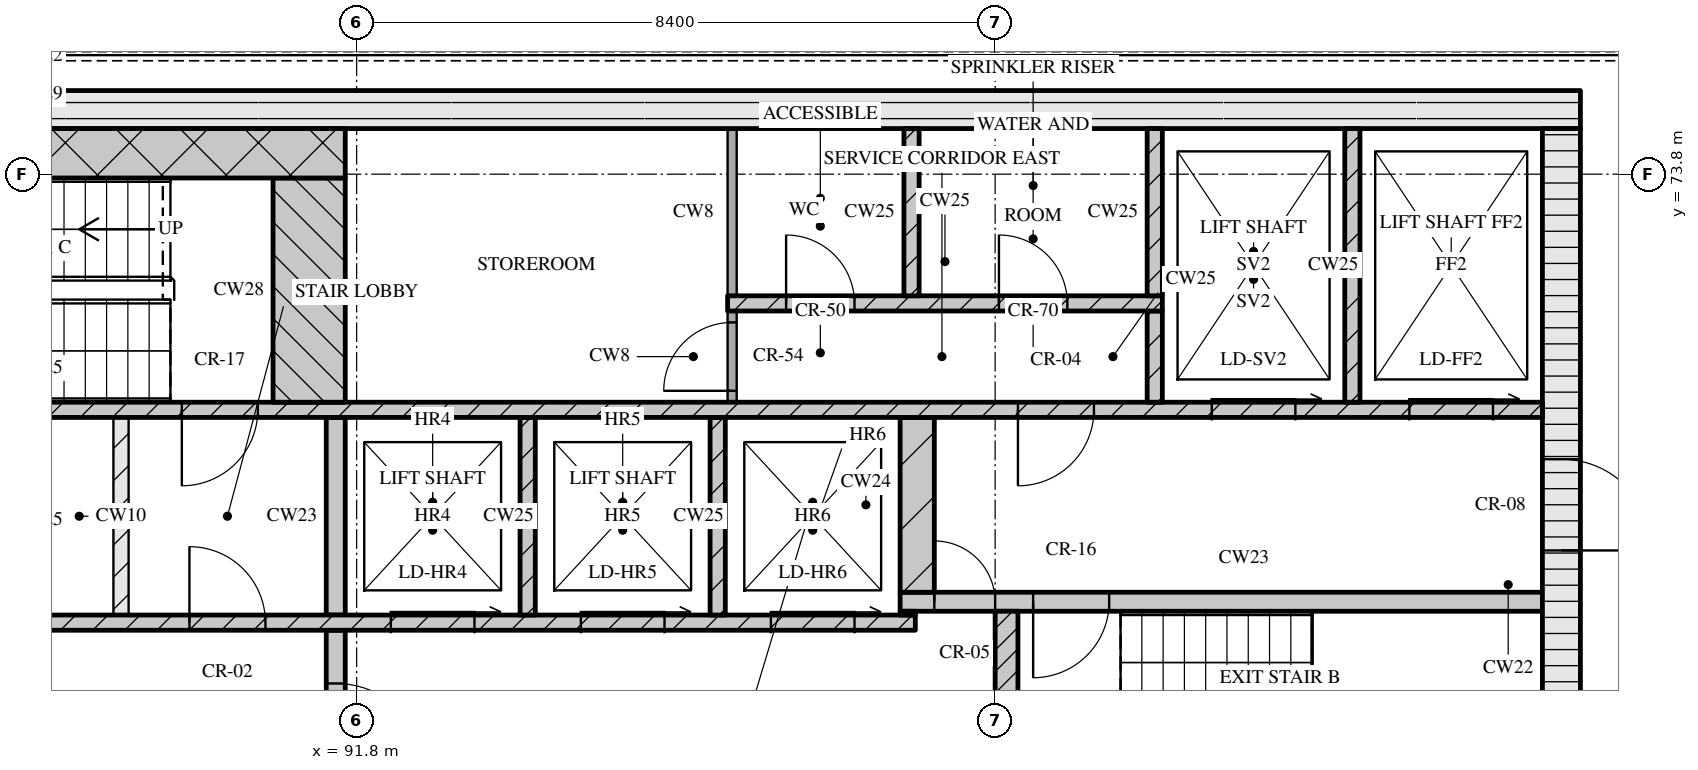
"""IFC4 building model, lengths in metres.
Left out: names, types, materials, properties, quantities, classifications, styles, units other than length and angle.
Written with IfcOpenShell. Run it as: python <this file> out.ifc"""

import sys

from ifc_helpers import new_model, si_unit, direction, frame, frame_2d, origin, place, context, subcontext, project, spatial, rectangle, extrude, element, fill, save


model = new_model("IFC4")
c1 = context("Model", 3, precision=1e-05, world=origin(), true_north=direction((0.0, 1.0)))
c2 = subcontext(c1, "Body", "Model", "MODEL_VIEW")
j1 = project(units=[si_unit("LENGTHUNIT", "METRE"), si_unit("PLANEANGLEUNIT", "RADIAN")], contexts=[c1])
p1 = place(None, origin())
s1 = spatial("IfcSite", under=j1, at=p1, CompositionType="ELEMENT")
p2 = place(p1, origin())
s2 = spatial("IfcBuilding", under=s1, at=p2, CompositionType="ELEMENT")
p3 = place(p2, frame((0.0, 0.0, 288.75)))
s3 = spatial("IfcBuildingStorey", under=s2, at=p3, CompositionType="ELEMENT", Elevation=288.75)
p4 = place(p3, frame((67.3, 74.65, 0.0), z_axis=(0.0, 0.0, 1.0), x_axis=(1.0, 0.0, 0.0)))
e1 = element("IfcWall", 1, at=p4, inside=s3, PredefinedType="SOLIDWALL", context=c2, shape_type="SweptSolid", body=[
    extrude(rectangle(XDim=40.6, YDim=0.5, at=frame_2d((20.3, 0.0))), origin(), (0.0, 0.0, 1.0), 3.32),
])
p5 = place(p3, frame((107.65, 62.4, 0.0), z_axis=(0.0, 0.0, 1.0), x_axis=(0.0, 1.0, 0.0)))
e2 = element("IfcWall", 2, at=p5, inside=s3, PredefinedType="SOLIDWALL", context=c2, shape_type="SweptSolid", body=[
    extrude(rectangle(XDim=12.0, YDim=0.5, at=frame_2d((6.0, 0.0))), origin(), (0.0, 0.0, 1.0), 3.32),
])
p6 = place(p5, frame((6.45, 0.0, 0.0)))
e3 = element("IfcOpeningElement", 3, at=p6, cuts=e2, PredefinedType="OPENING", context=c2, shape_type="SweptSolid", body=[
    extrude(rectangle(XDim=1.2, YDim=2.1, at=frame_2d((0.6, 1.05))), frame((0.0, 0.26, 0.0), z_axis=(0.0, -1.0, 0.0), x_axis=(1.0, 0.0, 0.0)), (0.0, 0.0, 1.0), 0.52),
])
p7 = place(p3, frame((91.525, 65.2, 0.0), z_axis=(0.0, 0.0, 1.0), x_axis=(0.0, 1.0, 0.0)))
e4 = element("IfcWall", 4, at=p7, inside=s3, PredefinedType="SOLIDWALL", context=c2, shape_type="SweptSolid", body=[
    extrude(rectangle(XDim=2.6, YDim=0.25, at=frame_2d((1.3, 0.0))), origin(), (0.0, 0.0, 1.0), 3.32),
])
p8 = place(p7, frame((0.7, 0.0, 0.0)))
e5 = element("IfcOpeningElement", 5, at=p8, cuts=e4, PredefinedType="OPENING", context=c2, shape_type="SweptSolid", body=[
    extrude(rectangle(XDim=1.2, YDim=2.1, at=frame_2d((0.6, 1.05))), frame((0.0, 0.135, 0.0), z_axis=(0.0, -1.0, 0.0), x_axis=(1.0, 0.0, 0.0)), (0.0, 0.0, 1.0), 0.27),
])
p9 = place(p3, frame((100.35, 65.2, 0.0), z_axis=(0.0, 0.0, 1.0), x_axis=(0.0, 1.0, 0.0)))
e6 = element("IfcWall", 6, at=p9, inside=s3, PredefinedType="SOLIDWALL", context=c2, shape_type="SweptSolid", body=[
    extrude(rectangle(XDim=2.85, YDim=0.3, at=frame_2d((1.425, 0.0))), origin(), (0.0, 0.0, 1.0), 3.32),
])
p10 = place(p3, frame((76.05, 67.9, 0.0), z_axis=(0.0, 0.0, 1.0), x_axis=(1.0, 0.0, 0.0)))
e7 = element("IfcWall", 7, at=p10, inside=s3, PredefinedType="SOLIDWALL", context=c2, shape_type="SweptSolid", body=[
    extrude(rectangle(XDim=23.1, YDim=0.2, at=frame_2d((11.55, 0.0))), origin(), (0.0, 0.0, 1.0), 3.32),
])
p11 = place(p10, frame((1.95, 0.0, 0.0)))
e8 = element("IfcOpeningElement", 8, at=p11, cuts=e7, PredefinedType="OPENING", context=c2, shape_type="SweptSolid", body=[
    extrude(rectangle(XDim=0.9, YDim=2.1, at=frame_2d((0.45, 1.05))), frame((0.0, 0.11, 0.0), z_axis=(0.0, -1.0, 0.0), x_axis=(1.0, 0.0, 0.0)), (0.0, 0.0, 1.0), 0.22),
])
p12 = place(p10, frame((5.66, 0.0, 0.0)))
e9 = element("IfcOpeningElement", 9, at=p12, cuts=e7, PredefinedType="OPENING", context=c2, shape_type="SweptSolid", body=[
    extrude(rectangle(XDim=0.9, YDim=2.1, at=frame_2d((0.45, 1.05))), frame((0.0, 0.11, 0.0), z_axis=(0.0, -1.0, 0.0), x_axis=(1.0, 0.0, 0.0)), (0.0, 0.0, 1.0), 0.22),
])
p13 = place(p10, frame((9.7, 0.0, 0.0)))
e10 = element("IfcOpeningElement", 10, at=p13, cuts=e7, PredefinedType="OPENING", context=c2, shape_type="SweptSolid", body=[
    extrude(rectangle(XDim=0.9, YDim=2.1, at=frame_2d((0.45, 1.05))), frame((0.0, 0.11, 0.0), z_axis=(0.0, -1.0, 0.0), x_axis=(1.0, 0.0, 0.0)), (0.0, 0.0, 1.0), 0.22),
])
p14 = place(p10, frame((13.55, 0.0, 0.0)))
e11 = element("IfcOpeningElement", 11, at=p14, cuts=e7, PredefinedType="OPENING", context=c2, shape_type="SweptSolid", body=[
    extrude(rectangle(XDim=1.0, YDim=2.1, at=frame_2d((0.5, 1.05))), frame((0.0, 0.11, 0.0), z_axis=(0.0, -1.0, 0.0), x_axis=(1.0, 0.0, 0.0)), (0.0, 0.0, 1.0), 0.22),
])
p15 = place(p10, frame((16.2, 0.0, 0.0)))
e12 = element("IfcOpeningElement", 12, at=p15, cuts=e7, PredefinedType="OPENING", context=c2, shape_type="SweptSolid", body=[
    extrude(rectangle(XDim=1.1, YDim=2.1, at=frame_2d((0.55, 1.05))), frame((0.0, 0.11, 0.0), z_axis=(0.0, -1.0, 0.0), x_axis=(1.0, 0.0, 0.0)), (0.0, 0.0, 1.0), 0.22),
])
p16 = place(p10, frame((18.7, 0.0, 0.0)))
e13 = element("IfcOpeningElement", 13, at=p16, cuts=e7, PredefinedType="OPENING", context=c2, shape_type="SweptSolid", body=[
    extrude(rectangle(XDim=1.1, YDim=2.1, at=frame_2d((0.55, 1.05))), frame((0.0, 0.11, 0.0), z_axis=(0.0, -1.0, 0.0), x_axis=(1.0, 0.0, 0.0)), (0.0, 0.0, 1.0), 0.22),
])
p17 = place(p10, frame((21.2, 0.0, 0.0)))
e14 = element("IfcOpeningElement", 14, at=p17, cuts=e7, PredefinedType="OPENING", context=c2, shape_type="SweptSolid", body=[
    extrude(rectangle(XDim=1.1, YDim=2.1, at=frame_2d((0.55, 1.05))), frame((0.0, 0.11, 0.0), z_axis=(0.0, -1.0, 0.0), x_axis=(1.0, 0.0, 0.0)), (0.0, 0.0, 1.0), 0.22),
])
p18 = place(p3, frame((88.7, 68.0, 0.0), z_axis=(0.0, 0.0, 1.0), x_axis=(0.0, 1.0, 0.0)))
e15 = element("IfcWall", 15, at=p18, inside=s3, PredefinedType="PARTITIONING", context=c2, shape_type="SweptSolid", body=[
    extrude(rectangle(XDim=2.6, YDim=0.2, at=frame_2d((1.3, 0.0))), origin(), (0.0, 0.0, 1.0), 3.32),
])
p19 = place(p3, frame((91.525, 68.0, 0.0), z_axis=(0.0, 0.0, 1.0), x_axis=(0.0, 1.0, 0.0)))
e16 = element("IfcWall", 16, at=p19, inside=s3, PredefinedType="SOLIDWALL", context=c2, shape_type="SweptSolid", body=[
    extrude(rectangle(XDim=2.6, YDim=0.25, at=frame_2d((1.3, 0.0))), origin(), (0.0, 0.0, 1.0), 3.32),
])
for number, where, z_axis, x_axis in (
    (17, (94.05, 68.0, 0.0), (0.0, 0.0, 1.0), (0.0, 1.0, 0.0)),
    (18, (96.55, 68.0, 0.0), (0.0, 0.0, 1.0), (0.0, 1.0, 0.0)),
):
    element("IfcWall", number, at=place(p3, frame(where, z_axis=z_axis, x_axis=x_axis)), inside=s3, PredefinedType="SOLIDWALL", context=c2, shape_type="SweptSolid", body=[
        extrude(rectangle(XDim=2.6, YDim=0.2, at=frame_2d((1.3, 0.0))), origin(), (0.0, 0.0, 1.0), 3.32),
    ])
p20 = place(p3, frame((98.95, 68.025, 0.0), z_axis=(0.0, 0.0, 1.0), x_axis=(1.0, 0.0, 0.0)))
e19 = element("IfcWall", 19, at=p20, inside=s3, PredefinedType="SOLIDWALL", context=c2, shape_type="SweptSolid", body=[
    extrude(rectangle(XDim=0.2, YDim=0.05, at=frame_2d((0.1, 0.0))), origin(), (0.0, 0.0, 1.0), 3.32),
])
p21 = place(p3, frame((98.95, 68.175, 0.0), z_axis=(0.0, 0.0, 1.0), x_axis=(1.0, 0.0, 0.0)))
e20 = element("IfcWall", 20, at=p21, inside=s3, PredefinedType="SOLIDWALL", context=c2, shape_type="SweptSolid", body=[
    extrude(rectangle(XDim=8.45, YDim=0.25, at=frame_2d((4.225, 0.0))), origin(), (0.0, 0.0, 1.0), 3.32),
])
p22 = place(p21, frame((0.45, 0.0, 0.0)))
e21 = element("IfcOpeningElement", 21, at=p22, cuts=e20, PredefinedType="OPENING", context=c2, shape_type="SweptSolid", body=[
    extrude(rectangle(XDim=0.8, YDim=2.1, at=frame_2d((0.4, 1.05))), frame((0.0, 0.135, 0.0), z_axis=(0.0, -1.0, 0.0), x_axis=(1.0, 0.0, 0.0)), (0.0, 0.0, 1.0), 0.27),
])
p23 = place(p21, frame((1.75, 0.0, 0.0)))
e22 = element("IfcOpeningElement", 22, at=p23, cuts=e20, PredefinedType="OPENING", context=c2, shape_type="SweptSolid", body=[
    extrude(rectangle(XDim=1.0, YDim=2.1, at=frame_2d((0.5, 1.05))), frame((0.0, 0.135, 0.0), z_axis=(0.0, -1.0, 0.0), x_axis=(1.0, 0.0, 0.0)), (0.0, 0.0, 1.0), 0.27),
])
p24 = place(p3, frame((99.175, 68.3, 0.0), z_axis=(0.0, 0.0, 1.0), x_axis=(0.0, 1.0, 0.0)))
e23 = element("IfcWall", 23, at=p24, inside=s3, PredefinedType="SOLIDWALL", context=c2, shape_type="SweptSolid", body=[
    extrude(rectangle(XDim=2.3, YDim=0.45, at=frame_2d((1.15, 0.0))), origin(), (0.0, 0.0, 1.0), 3.32),
])
p25 = place(p3, frame((67.8, 70.7, 0.0), z_axis=(0.0, 0.0, 1.0), x_axis=(1.0, 0.0, 0.0)))
e24 = element("IfcWall", 24, at=p25, inside=s3, PredefinedType="SOLIDWALL", context=c2, shape_type="SweptSolid", body=[
    extrude(rectangle(XDim=39.6, YDim=0.2, at=frame_2d((19.8, 0.0))), origin(), (0.0, 0.0, 1.0), 3.32),
])
p26 = place(p25, frame((0.65, 0.0, 0.0)))
e25 = element("IfcOpeningElement", 25, at=p26, cuts=e24, PredefinedType="OPENING", context=c2, shape_type="SweptSolid", body=[
    extrude(rectangle(XDim=1.1, YDim=2.1, at=frame_2d((0.55, 1.05))), frame((0.0, 0.11, 0.0), z_axis=(0.0, -1.0, 0.0), x_axis=(1.0, 0.0, 0.0)), (0.0, 0.0, 1.0), 0.22),
])
p27 = place(p25, frame((3.25, 0.0, 0.0)))
e26 = element("IfcOpeningElement", 26, at=p27, cuts=e24, PredefinedType="OPENING", context=c2, shape_type="SweptSolid", body=[
    extrude(rectangle(XDim=1.1, YDim=2.1, at=frame_2d((0.55, 1.05))), frame((0.0, 0.11, 0.0), z_axis=(0.0, -1.0, 0.0), x_axis=(1.0, 0.0, 0.0)), (0.0, 0.0, 1.0), 0.22),
])
p28 = place(p25, frame((5.9, 0.0, 0.0)))
e27 = element("IfcOpeningElement", 27, at=p28, cuts=e24, PredefinedType="OPENING", context=c2, shape_type="SweptSolid", body=[
    extrude(rectangle(XDim=1.0, YDim=2.1, at=frame_2d((0.5, 1.05))), frame((0.0, 0.11, 0.0), z_axis=(0.0, -1.0, 0.0), x_axis=(1.0, 0.0, 0.0)), (0.0, 0.0, 1.0), 0.22),
])
p29 = place(p25, frame((21.7, 0.0, 0.0)))
e28 = element("IfcOpeningElement", 28, at=p29, cuts=e24, PredefinedType="OPENING", context=c2, shape_type="SweptSolid", body=[
    extrude(rectangle(XDim=1.0, YDim=2.1, at=frame_2d((0.5, 1.05))), frame((0.0, 0.11, 0.0), z_axis=(0.0, -1.0, 0.0), x_axis=(1.0, 0.0, 0.0)), (0.0, 0.0, 1.0), 0.22),
])
p30 = place(p25, frame((32.7, 0.0, 0.0)))
e29 = element("IfcOpeningElement", 29, at=p30, cuts=e24, PredefinedType="OPENING", context=c2, shape_type="SweptSolid", body=[
    extrude(rectangle(XDim=1.0, YDim=2.1, at=frame_2d((0.5, 1.05))), frame((0.0, 0.11, 0.0), z_axis=(0.0, -1.0, 0.0), x_axis=(1.0, 0.0, 0.0)), (0.0, 0.0, 1.0), 0.22),
])
p31 = place(p25, frame((35.25, 0.0, 0.0)))
e30 = element("IfcOpeningElement", 30, at=p31, cuts=e24, PredefinedType="OPENING", context=c2, shape_type="SweptSolid", body=[
    extrude(rectangle(XDim=1.1, YDim=2.1, at=frame_2d((0.55, 1.05))), frame((0.0, 0.11, 0.0), z_axis=(0.0, -1.0, 0.0), x_axis=(1.0, 0.0, 0.0)), (0.0, 0.0, 1.0), 0.22),
])
p32 = place(p25, frame((37.85, 0.0, 0.0)))
e31 = element("IfcOpeningElement", 31, at=p32, cuts=e24, PredefinedType="OPENING", context=c2, shape_type="SweptSolid", body=[
    extrude(rectangle(XDim=1.1, YDim=2.1, at=frame_2d((0.55, 1.05))), frame((0.0, 0.11, 0.0), z_axis=(0.0, -1.0, 0.0), x_axis=(1.0, 0.0, 0.0)), (0.0, 0.0, 1.0), 0.22),
])
p33 = place(p3, frame((91.175, 70.8, 0.0), z_axis=(0.0, 0.0, 1.0), x_axis=(0.0, 1.0, 0.0)))
e32 = element("IfcWall", 32, at=p33, inside=s3, PredefinedType="SOLIDWALL", context=c2, shape_type="SweptSolid", body=[
    extrude(rectangle(XDim=2.95, YDim=0.95, at=frame_2d((1.475, 0.0))), origin(), (0.0, 0.0, 1.0), 3.32),
])
p34 = place(p3, frame((96.74, 70.8, 0.0), z_axis=(0.0, 0.0, 1.0), x_axis=(0.0, 1.0, 0.0)))
e33 = element("IfcWall", 33, at=p34, inside=s3, PredefinedType="PARTITIONING", context=c2, shape_type="SweptSolid", body=[
    extrude(rectangle(XDim=1.2, YDim=0.12, at=frame_2d((0.6, 0.0))), origin(), (0.0, 0.0, 1.0), 3.32),
])
p35 = place(p34, frame((0.15, 0.0, 0.0)))
e34 = element("IfcOpeningElement", 34, at=p35, cuts=e33, PredefinedType="OPENING", context=c2, shape_type="SweptSolid", body=[
    extrude(rectangle(XDim=0.9, YDim=2.1, at=frame_2d((0.45, 1.05))), frame((0.0, 0.07, 0.0), z_axis=(0.0, -1.0, 0.0), x_axis=(1.0, 0.0, 0.0)), (0.0, 0.0, 1.0), 0.14),
])
p36 = place(p3, frame((102.3, 70.8, 0.0), z_axis=(0.0, 0.0, 1.0), x_axis=(0.0, 1.0, 0.0)))
e35 = element("IfcWall", 35, at=p36, inside=s3, PredefinedType="SOLIDWALL", context=c2, shape_type="SweptSolid", body=[
    extrude(rectangle(XDim=1.2, YDim=0.2, at=frame_2d((0.6, 0.0))), origin(), (0.0, 0.0, 1.0), 3.32),
])
p37 = place(p3, frame((104.9, 70.8, 0.0), z_axis=(0.0, 0.0, 1.0), x_axis=(0.0, 1.0, 0.0)))
e36 = element("IfcWall", 36, at=p37, inside=s3, PredefinedType="SOLIDWALL", context=c2, shape_type="SweptSolid", body=[
    extrude(rectangle(XDim=3.6, YDim=0.2, at=frame_2d((1.8, 0.0))), origin(), (0.0, 0.0, 1.0), 3.32),
])
p38 = place(p3, frame((96.68, 72.1, 0.0), z_axis=(0.0, 0.0, 1.0), x_axis=(1.0, 0.0, 0.0)))
e37 = element("IfcWall", 37, at=p38, inside=s3, PredefinedType="SOLIDWALL", context=c2, shape_type="SweptSolid", body=[
    extrude(rectangle(XDim=5.72, YDim=0.2, at=frame_2d((2.86, 0.0))), origin(), (0.0, 0.0, 1.0), 3.32),
])
p39 = place(p38, frame((0.77, 0.0, 0.0)))
e38 = element("IfcOpeningElement", 38, at=p39, cuts=e37, PredefinedType="OPENING", context=c2, shape_type="SweptSolid", body=[
    extrude(rectangle(XDim=0.9, YDim=2.1, at=frame_2d((0.45, 1.05))), frame((0.0, 0.11, 0.0), z_axis=(0.0, -1.0, 0.0), x_axis=(1.0, 0.0, 0.0)), (0.0, 0.0, 1.0), 0.22),
])
p40 = place(p38, frame((3.57, 0.0, 0.0)))
e39 = element("IfcOpeningElement", 39, at=p40, cuts=e37, PredefinedType="OPENING", context=c2, shape_type="SweptSolid", body=[
    extrude(rectangle(XDim=0.9, YDim=2.1, at=frame_2d((0.45, 1.05))), frame((0.0, 0.11, 0.0), z_axis=(0.0, -1.0, 0.0), x_axis=(1.0, 0.0, 0.0)), (0.0, 0.0, 1.0), 0.22),
])
p41 = place(p3, frame((96.74, 72.2, 0.0), z_axis=(0.0, 0.0, 1.0), x_axis=(0.0, 1.0, 0.0)))
e40 = element("IfcWall", 40, at=p41, inside=s3, PredefinedType="PARTITIONING", context=c2, shape_type="SweptSolid", body=[
    extrude(rectangle(XDim=2.2, YDim=0.12, at=frame_2d((1.1, 0.0))), origin(), (0.0, 0.0, 1.0), 3.32),
])
for number, where, z_axis, x_axis in (
    (41, (99.1, 72.2, 0.0), (0.0, 0.0, 1.0), (0.0, 1.0, 0.0)),
    (42, (102.3, 72.2, 0.0), (0.0, 0.0, 1.0), (0.0, 1.0, 0.0)),
):
    element("IfcWall", number, at=place(p3, frame(where, z_axis=z_axis, x_axis=x_axis)), inside=s3, PredefinedType="SOLIDWALL", context=c2, shape_type="SweptSolid", body=[
        extrude(rectangle(XDim=2.2, YDim=0.2, at=frame_2d((1.1, 0.0))), origin(), (0.0, 0.0, 1.0), 3.32),
    ])
p42 = place(p3, frame((83.55, 74.075, 0.0), z_axis=(0.0, 0.0, 1.0), x_axis=(1.0, 0.0, 0.0)))
e43 = element("IfcWall", 43, at=p42, inside=s3, PredefinedType="SOLIDWALL", context=c2, shape_type="SweptSolid", body=[
    extrude(rectangle(XDim=8.1, YDim=0.65, at=frame_2d((4.05, 0.0))), origin(), (0.0, 0.0, 1.0), 3.32),
])
p43 = place(p8, origin())
e44 = element("IfcDoor", 44, at=p43, inside=s3, OperationType="SINGLE_SWING_RIGHT", PredefinedType="DOOR", context=c2, shape_type="SweptSolid", body=[
    extrude(rectangle(XDim=1.2, YDim=2.1, at=frame_2d((0.6, 1.05))), frame((0.0, 0.025, 0.0), z_axis=(0.0, -1.0, 0.0), x_axis=(1.0, 0.0, 0.0)), (0.0, 0.0, 1.0), 0.05),
])
fill(e5, e44)
p44 = place(p14, origin())
e45 = element("IfcDoor", 45, at=p44, inside=s3, OperationType="SINGLE_SWING_LEFT", PredefinedType="DOOR", context=c2, shape_type="SweptSolid", body=[
    extrude(rectangle(XDim=1.0, YDim=2.1, at=frame_2d((0.5, 1.05))), frame((0.0, 0.025, 0.0), z_axis=(0.0, -1.0, 0.0), x_axis=(1.0, 0.0, 0.0)), (0.0, 0.0, 1.0), 0.05),
])
fill(e11, e45)
p45 = place(p15, origin())
e46 = element("IfcDoor", 46, at=p45, inside=s3, OperationType="SLIDING_TO_RIGHT", PredefinedType="DOOR", context=c2, shape_type="SweptSolid", body=[
    extrude(rectangle(XDim=1.1, YDim=2.1, at=frame_2d((0.55, 1.05))), frame((0.0, 0.025, 0.0), z_axis=(0.0, -1.0, 0.0), x_axis=(1.0, 0.0, 0.0)), (0.0, 0.0, 1.0), 0.05),
])
fill(e12, e46)
p46 = place(p16, origin())
e47 = element("IfcDoor", 47, at=p46, inside=s3, OperationType="SLIDING_TO_RIGHT", PredefinedType="DOOR", context=c2, shape_type="SweptSolid", body=[
    extrude(rectangle(XDim=1.1, YDim=2.1, at=frame_2d((0.55, 1.05))), frame((0.0, 0.025, 0.0), z_axis=(0.0, -1.0, 0.0), x_axis=(1.0, 0.0, 0.0)), (0.0, 0.0, 1.0), 0.05),
])
fill(e13, e47)
p47 = place(p17, origin())
e48 = element("IfcDoor", 48, at=p47, inside=s3, OperationType="SLIDING_TO_RIGHT", PredefinedType="DOOR", context=c2, shape_type="SweptSolid", body=[
    extrude(rectangle(XDim=1.1, YDim=2.1, at=frame_2d((0.55, 1.05))), frame((0.0, 0.025, 0.0), z_axis=(0.0, -1.0, 0.0), x_axis=(1.0, 0.0, 0.0)), (0.0, 0.0, 1.0), 0.05),
])
fill(e14, e48)
p48 = place(p22, origin())
e49 = element("IfcDoor", 49, at=p48, inside=s3, OperationType="SINGLE_SWING_LEFT", PredefinedType="DOOR", context=c2, shape_type="SweptSolid", body=[
    extrude(rectangle(XDim=0.8, YDim=2.1, at=frame_2d((0.4, 1.05))), frame((0.0, 0.025, 0.0), z_axis=(0.0, -1.0, 0.0), x_axis=(1.0, 0.0, 0.0)), (0.0, 0.0, 1.0), 0.05),
])
fill(e21, e49)
p49 = place(p23, origin())
e50 = element("IfcDoor", 50, at=p49, inside=s3, OperationType="SINGLE_SWING_RIGHT", PredefinedType="DOOR", context=c2, shape_type="SweptSolid", body=[
    extrude(rectangle(XDim=1.0, YDim=2.1, at=frame_2d((0.5, 1.05))), frame((0.0, 0.025, 0.0), z_axis=(0.0, -1.0, 0.0), x_axis=(1.0, 0.0, 0.0)), (0.0, 0.0, 1.0), 0.05),
])
fill(e22, e50)
p50 = place(p6, origin())
e51 = element("IfcDoor", 51, at=p50, inside=s3, OperationType="SINGLE_SWING_RIGHT", PredefinedType="DOOR", context=c2, shape_type="SweptSolid", body=[
    extrude(rectangle(XDim=1.2, YDim=2.1, at=frame_2d((0.6, 1.05))), frame((0.0, 0.025, 0.0), z_axis=(0.0, -1.0, 0.0), x_axis=(1.0, 0.0, 0.0)), (0.0, 0.0, 1.0), 0.05),
])
fill(e3, e51)
p51 = place(p29, origin())
e52 = element("IfcDoor", 52, at=p51, inside=s3, OperationType="SINGLE_SWING_RIGHT", PredefinedType="DOOR", context=c2, shape_type="SweptSolid", body=[
    extrude(rectangle(XDim=1.0, YDim=2.1, at=frame_2d((0.5, 1.05))), frame((0.0, 0.025, 0.0), z_axis=(0.0, -1.0, 0.0), x_axis=(1.0, 0.0, 0.0)), (0.0, 0.0, 1.0), 0.05),
])
fill(e28, e52)
p52 = place(p30, origin())
e53 = element("IfcDoor", 53, at=p52, inside=s3, OperationType="SINGLE_SWING_RIGHT", PredefinedType="DOOR", context=c2, shape_type="SweptSolid", body=[
    extrude(rectangle(XDim=1.0, YDim=2.1, at=frame_2d((0.5, 1.05))), frame((0.0, 0.025, 0.0), z_axis=(0.0, -1.0, 0.0), x_axis=(1.0, 0.0, 0.0)), (0.0, 0.0, 1.0), 0.05),
])
fill(e29, e53)
p53 = place(p31, origin())
e54 = element("IfcDoor", 54, at=p53, inside=s3, OperationType="SLIDING_TO_RIGHT", PredefinedType="DOOR", context=c2, shape_type="SweptSolid", body=[
    extrude(rectangle(XDim=1.1, YDim=2.1, at=frame_2d((0.55, 1.05))), frame((0.0, 0.025, 0.0), z_axis=(0.0, -1.0, 0.0), x_axis=(1.0, 0.0, 0.0)), (0.0, 0.0, 1.0), 0.05),
])
fill(e30, e54)
p54 = place(p32, origin())
e55 = element("IfcDoor", 55, at=p54, inside=s3, OperationType="SLIDING_TO_RIGHT", PredefinedType="DOOR", context=c2, shape_type="SweptSolid", body=[
    extrude(rectangle(XDim=1.1, YDim=2.1, at=frame_2d((0.55, 1.05))), frame((0.0, 0.025, 0.0), z_axis=(0.0, -1.0, 0.0), x_axis=(1.0, 0.0, 0.0)), (0.0, 0.0, 1.0), 0.05),
])
fill(e31, e55)
p55 = place(p35, origin())
e56 = element("IfcDoor", 56, at=p55, inside=s3, OperationType="SINGLE_SWING_LEFT", PredefinedType="DOOR", context=c2, shape_type="SweptSolid", body=[
    extrude(rectangle(XDim=0.9, YDim=2.1, at=frame_2d((0.45, 1.05))), frame((0.0, 0.025, 0.0), z_axis=(0.0, -1.0, 0.0), x_axis=(1.0, 0.0, 0.0)), (0.0, 0.0, 1.0), 0.05),
])
fill(e34, e56)
p56 = place(p39, origin())
e57 = element("IfcDoor", 57, at=p56, inside=s3, OperationType="SINGLE_SWING_LEFT", PredefinedType="DOOR", context=c2, shape_type="SweptSolid", body=[
    extrude(rectangle(XDim=0.9, YDim=2.1, at=frame_2d((0.45, 1.05))), frame((0.0, 0.025, 0.0), z_axis=(0.0, -1.0, 0.0), x_axis=(1.0, 0.0, 0.0)), (0.0, 0.0, 1.0), 0.05),
])
fill(e38, e57)
p57 = place(p40, origin())
e58 = element("IfcDoor", 58, at=p57, inside=s3, OperationType="SINGLE_SWING_LEFT", PredefinedType="DOOR", context=c2, shape_type="SweptSolid", body=[
    extrude(rectangle(XDim=0.9, YDim=2.1, at=frame_2d((0.45, 1.05))), frame((0.0, 0.025, 0.0), z_axis=(0.0, -1.0, 0.0), x_axis=(1.0, 0.0, 0.0)), (0.0, 0.0, 1.0), 0.05),
])
fill(e39, e58)
save(model, sys.argv[1])
